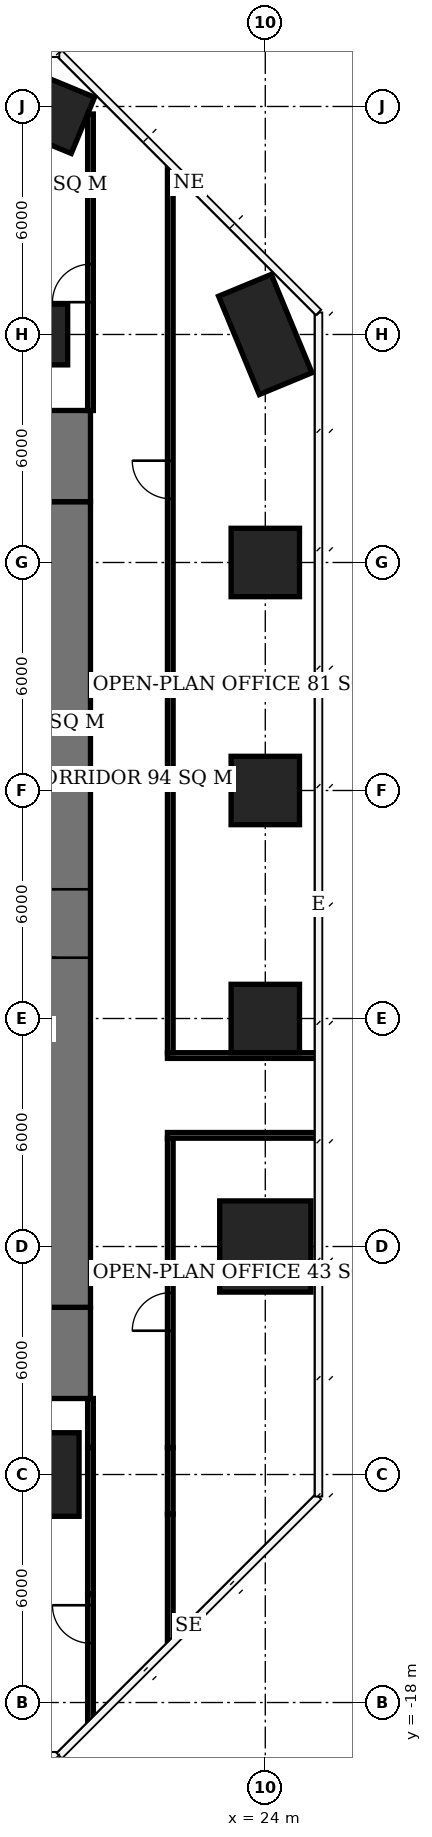
"""IFC4 building model, lengths in metres.
Left out: names, types, materials, properties, quantities, classifications, styles, units other than length and angle.
Written with IfcOpenShell. Run it as: python <this file> out.ifc"""

import sys

from ifc_helpers import new_model, si_unit, direction, frame, frame_2d, origin, origin_2d, place, context, subcontext, project, spatial, rectangle, extrude, element, fill, save


model = new_model("IFC4")
c1 = context("Model", 3, precision=1e-05, world=origin(), true_north=direction((0.0, 1.0)))
c2 = subcontext(c1, "Body", "Model", "MODEL_VIEW")
j1 = project(units=[si_unit("LENGTHUNIT", "METRE"), si_unit("PLANEANGLEUNIT", "RADIAN")], contexts=[c1])
p1 = place(None, origin())
s1 = spatial("IfcSite", under=j1, at=p1, CompositionType="ELEMENT")
p2 = place(p1, origin())
s2 = spatial("IfcBuilding", under=s1, at=p2, CompositionType="ELEMENT")
p3 = place(p2, frame((0.0, 0.0, 132.8)))
s3 = spatial("IfcBuildingStorey", under=s2, at=p3, CompositionType="ELEMENT", Elevation=132.8)
p4 = place(p3, frame((18.0, -12.0, 0.0), z_axis=(0.0, 0.0, 1.0), x_axis=(1.0, 0.0, 0.0)))
e1 = element("IfcColumn", 1, at=p4, inside=s3, PredefinedType="COLUMN", context=c2, shape_type="SweptSolid", body=[
    extrude(rectangle(XDim=2.2, YDim=2.2, at=origin_2d()), origin(), (0.0, 0.0, 1.0), 3.9),
])
p5 = place(p3, frame((18.0, 18.0, 0.0), z_axis=(0.0, 0.0, 1.0), x_axis=(1.0, 0.0, 0.0)))
e2 = element("IfcColumn", 2, at=p5, inside=s3, PredefinedType="COLUMN", context=c2, shape_type="SweptSolid", body=[
    extrude(rectangle(XDim=1.6, YDim=1.6, at=origin_2d()), origin(), (0.0, 0.0, 1.0), 3.9),
])
p6 = place(p3, frame((18.0, 24.0, 0.0), z_axis=(0.0, 0.0, 1.0), x_axis=(0.923879532511, -0.382683432365, 0.0)))
e3 = element("IfcColumn", 3, at=p6, inside=s3, PredefinedType="COLUMN", context=c2, shape_type="SweptSolid", body=[
    extrude(rectangle(XDim=2.6, YDim=1.6, at=origin_2d()), origin(), (0.0, 0.0, 1.0), 3.9),
])
p7 = place(p3, frame((24.0, -6.0, 0.0), z_axis=(0.0, 0.0, 1.0), x_axis=(1.0, 0.0, 0.0)))
e4 = element("IfcColumn", 4, at=p7, inside=s3, PredefinedType="COLUMN", context=c2, shape_type="SweptSolid", body=[
    extrude(rectangle(XDim=2.4, YDim=2.4, at=origin_2d()), origin(), (0.0, 0.0, 1.0), 3.9),
])
for number, where, z_axis, x_axis in (
    (5, (24.0, 0.0, 0.0), (0.0, 0.0, 1.0), (1.0, 0.0, 0.0)),
    (6, (24.0, 6.0, 0.0), (0.0, 0.0, 1.0), (1.0, 0.0, 0.0)),
    (7, (24.0, 12.0, 0.0), (0.0, 0.0, 1.0), (1.0, 0.0, 0.0)),
):
    element("IfcColumn", number, at=place(p3, frame(where, z_axis=z_axis, x_axis=x_axis)), inside=s3, PredefinedType="COLUMN", context=c2, shape_type="SweptSolid", body=[
        extrude(rectangle(XDim=1.8, YDim=1.8, at=origin_2d()), origin(), (0.0, 0.0, 1.0), 3.9),
    ])
p8 = place(p3, frame((24.0, 18.0, 0.0), z_axis=(0.0, 0.0, 1.0), x_axis=(0.382683432365, -0.923879532511, 0.0)))
e8 = element("IfcColumn", 8, at=p8, inside=s3, PredefinedType="COLUMN", context=c2, shape_type="SweptSolid", body=[
    extrude(rectangle(XDim=2.8, YDim=1.5, at=origin_2d()), origin(), (0.0, 0.0, 1.0), 3.9),
])
p9 = place(p3, frame((18.5, -7.6, 0.0), z_axis=(0.0, 0.0, 1.0), x_axis=(0.0, 1.0, 0.0)))
e9 = element("IfcWall", 9, at=p9, inside=s3, PredefinedType="SHEAR", context=c2, shape_type="SweptSolid", body=[
    extrude(rectangle(XDim=21.2, YDim=1.8, at=frame_2d((10.6, 0.0))), origin(), (0.0, 0.0, 1.0), 3.9),
])
p10 = place(p9, frame((9.2, 0.0, 0.0)))
e10 = element("IfcOpeningElement", 10, at=p10, cuts=e9, PredefinedType="OPENING", context=c2, shape_type="SweptSolid", body=[
    extrude(rectangle(XDim=1.8, YDim=2.4, at=frame_2d((0.9, 1.2))), frame((0.0, 0.91, 0.0), z_axis=(0.0, -1.0, 0.0), x_axis=(1.0, 0.0, 0.0)), (0.0, 0.0, 1.0), 1.82),
])
for number, where, z_axis, x_axis in (
    (11, (18.5, -10.0, 0.0), (0.0, 0.0, 1.0), (0.0, 1.0, 0.0)),
    (12, (18.5, 13.6, 0.0), (0.0, 0.0, 1.0), (0.0, 1.0, 0.0)),
):
    element("IfcWall", number, at=place(p3, frame(where, z_axis=z_axis, x_axis=x_axis)), inside=s3, PredefinedType="SHEAR", context=c2, shape_type="SweptSolid", body=[
        extrude(rectangle(XDim=2.4, YDim=1.8, at=frame_2d((1.2, 0.0))), origin(), (0.0, 0.0, 1.0), 3.9),
    ])
p11 = place(p3, frame((19.4, -18.489, 0.0), z_axis=(0.0, 0.0, 1.0), x_axis=(0.0, 1.0, 0.0)))
e13 = element("IfcWall", 13, at=p11, inside=s3, PredefinedType="PARTITIONING", context=c2, shape_type="SweptSolid", body=[
    extrude(rectangle(XDim=3.349, YDim=0.15, at=frame_2d((1.675, 0.0))), origin(), (0.0, 0.0, 1.0), 3.65),
])
p12 = place(p11, frame((2.049, 0.0, 0.0)))
e14 = element("IfcOpeningElement", 14, at=p12, cuts=e13, PredefinedType="OPENING", context=c2, shape_type="SweptSolid", body=[
    extrude(rectangle(XDim=1.0, YDim=2.1, at=frame_2d((0.5, 1.05))), frame((0.0, 0.085, 0.0), z_axis=(0.0, -1.0, 0.0), x_axis=(1.0, 0.0, 0.0)), (0.0, 0.0, 1.0), 0.17),
])
p13 = place(p3, frame((19.4, -15.14, 0.0), z_axis=(0.0, 0.0, 1.0), x_axis=(0.0, 1.0, 0.0)))
e15 = element("IfcWall", 15, at=p13, inside=s3, PredefinedType="PARTITIONING", context=c2, shape_type="SweptSolid", body=[
    extrude(rectangle(XDim=3.85, YDim=0.15, at=frame_2d((1.925, 0.0))), origin(), (0.0, 0.0, 1.0), 2.65),
])
p14 = place(p3, frame((19.4, -11.29, 0.0), z_axis=(0.0, 0.0, 1.0), x_axis=(0.0, 1.0, 0.0)))
e16 = element("IfcWall", 16, at=p14, inside=s3, PredefinedType="PARTITIONING", context=c2, shape_type="SweptSolid", body=[
    extrude(rectangle(XDim=1.29, YDim=0.15, at=frame_2d((0.645, 0.0))), origin(), (0.0, 0.0, 1.0), 3.65),
])
p15 = place(p3, frame((19.4, 16.0, 0.0), z_axis=(0.0, 0.0, 1.0), x_axis=(0.0, 1.0, 0.0)))
e17 = element("IfcWall", 17, at=p15, inside=s3, PredefinedType="PARTITIONING", context=c2, shape_type="SweptSolid", body=[
    extrude(rectangle(XDim=7.802, YDim=0.15, at=frame_2d((3.901, 0.0))), origin(), (0.0, 0.0, 1.0), 3.65),
])
p16 = place(p15, frame((2.85, 0.0, 0.0)))
e18 = element("IfcOpeningElement", 18, at=p16, cuts=e17, PredefinedType="OPENING", context=c2, shape_type="SweptSolid", body=[
    extrude(rectangle(XDim=1.0, YDim=2.1, at=frame_2d((0.5, 1.05))), frame((0.0, 0.085, 0.0), z_axis=(0.0, -1.0, 0.0), x_axis=(1.0, 0.0, 0.0)), (0.0, 0.0, 1.0), 0.17),
])
p17 = place(p3, frame((21.5, -16.388, 0.0), z_axis=(0.0, 0.0, 1.0), x_axis=(0.0, 1.0, 0.0)))
e19 = element("IfcWall", 19, at=p17, inside=s3, PredefinedType="PARTITIONING", context=c2, shape_type="SweptSolid", body=[
    extrude(rectangle(XDim=3.348, YDim=0.15, at=frame_2d((1.674, 0.0))), origin(), (0.0, 0.0, 1.0), 3.65),
])
p18 = place(p3, frame((21.5, -13.04, 0.0), z_axis=(0.0, 0.0, 1.0), x_axis=(0.0, 1.0, 0.0)))
e20 = element("IfcWall", 20, at=p18, inside=s3, PredefinedType="PARTITIONING", context=c2, shape_type="SweptSolid", body=[
    extrude(rectangle(XDim=1.75, YDim=0.15, at=frame_2d((0.875, 0.0))), origin(), (0.0, 0.0, 1.0), 2.65),
])
p19 = place(p3, frame((21.5, -11.29, 0.0), z_axis=(0.0, 0.0, 1.0), x_axis=(0.0, 1.0, 0.0)))
e21 = element("IfcWall", 21, at=p19, inside=s3, PredefinedType="PARTITIONING", context=c2, shape_type="SweptSolid", body=[
    extrude(rectangle(XDim=8.14, YDim=0.15, at=frame_2d((4.07, 0.0))), origin(), (0.0, 0.0, 1.0), 3.65),
])
p20 = place(p19, frame((3.074, 0.0, 0.0)))
e22 = element("IfcOpeningElement", 22, at=p20, cuts=e21, PredefinedType="OPENING", context=c2, shape_type="SweptSolid", body=[
    extrude(rectangle(XDim=1.0, YDim=2.1, at=frame_2d((0.5, 1.05))), frame((0.0, 0.085, 0.0), z_axis=(0.0, -1.0, 0.0), x_axis=(1.0, 0.0, 0.0)), (0.0, 0.0, 1.0), 0.17),
])
p21 = place(p3, frame((21.425, -3.075, 0.0), z_axis=(0.0, 0.0, 1.0), x_axis=(1.0, 0.0, 0.0)))
e23 = element("IfcWall", 23, at=p21, inside=s3, PredefinedType="PARTITIONING", context=c2, shape_type="SweptSolid", body=[
    extrude(rectangle(XDim=3.975, YDim=0.15, at=frame_2d((1.987, 0.0))), origin(), (0.0, 0.0, 1.0), 3.65),
])
p22 = place(p3, frame((21.5, -0.9, 0.0), z_axis=(0.0, 0.0, 1.0), x_axis=(0.0, 1.0, 0.0)))
e24 = element("IfcWall", 24, at=p22, inside=s3, PredefinedType="PARTITIONING", context=c2, shape_type="SweptSolid", body=[
    extrude(rectangle(XDim=23.288, YDim=0.15, at=frame_2d((11.644, 0.0))), origin(), (0.0, 0.0, 1.0), 3.65),
])
p23 = place(p22, frame((14.579, 0.0, 0.0)))
e25 = element("IfcOpeningElement", 25, at=p23, cuts=e24, PredefinedType="OPENING", context=c2, shape_type="SweptSolid", body=[
    extrude(rectangle(XDim=1.0, YDim=2.1, at=frame_2d((0.5, 1.05))), frame((0.0, 0.085, 0.0), z_axis=(0.0, -1.0, 0.0), x_axis=(1.0, 0.0, 0.0)), (0.0, 0.0, 1.0), 0.17),
])
p24 = place(p3, frame((21.425, -0.975, 0.0), z_axis=(0.0, 0.0, 1.0), x_axis=(1.0, 0.0, 0.0)))
e26 = element("IfcWall", 26, at=p24, inside=s3, PredefinedType="PARTITIONING", context=c2, shape_type="SweptSolid", body=[
    extrude(rectangle(XDim=3.975, YDim=0.15, at=frame_2d((1.987, 0.0))), origin(), (0.0, 0.0, 1.0), 3.65),
])
p25 = place(p10, origin())
e27 = element("IfcDoor", 27, at=p25, inside=s3, OperationType="DOUBLE_DOOR_SINGLE_SWING", PredefinedType="DOOR", context=c2, shape_type="SweptSolid", body=[
    extrude(rectangle(XDim=1.8, YDim=2.4, at=frame_2d((0.9, 1.2))), frame((0.0, 0.025, 0.0), z_axis=(0.0, -1.0, 0.0), x_axis=(1.0, 0.0, 0.0)), (0.0, 0.0, 1.0), 0.05),
])
fill(e10, e27)
p26 = place(p12, origin())
e28 = element("IfcDoor", 28, at=p26, inside=s3, OperationType="SINGLE_SWING_RIGHT", PredefinedType="DOOR", context=c2, shape_type="SweptSolid", body=[
    extrude(rectangle(XDim=1.0, YDim=2.1, at=frame_2d((0.5, 1.05))), frame((0.0, 0.025, 0.0), z_axis=(0.0, -1.0, 0.0), x_axis=(1.0, 0.0, 0.0)), (0.0, 0.0, 1.0), 0.05),
])
fill(e14, e28)
p27 = place(p20, origin())
e29 = element("IfcDoor", 29, at=p27, inside=s3, OperationType="SINGLE_SWING_LEFT", PredefinedType="DOOR", context=c2, shape_type="SweptSolid", body=[
    extrude(rectangle(XDim=1.0, YDim=2.1, at=frame_2d((0.5, 1.05))), frame((0.0, 0.025, 0.0), z_axis=(0.0, -1.0, 0.0), x_axis=(1.0, 0.0, 0.0)), (0.0, 0.0, 1.0), 0.05),
])
fill(e22, e29)
p28 = place(p23, origin())
e30 = element("IfcDoor", 30, at=p28, inside=s3, OperationType="SINGLE_SWING_RIGHT", PredefinedType="DOOR", context=c2, shape_type="SweptSolid", body=[
    extrude(rectangle(XDim=1.0, YDim=2.1, at=frame_2d((0.5, 1.05))), frame((0.0, 0.025, 0.0), z_axis=(0.0, -1.0, 0.0), x_axis=(1.0, 0.0, 0.0)), (0.0, 0.0, 1.0), 0.05),
])
fill(e25, e30)
p29 = place(p16, origin())
e31 = element("IfcDoor", 31, at=p29, inside=s3, OperationType="SINGLE_SWING_LEFT", PredefinedType="DOOR", context=c2, shape_type="SweptSolid", body=[
    extrude(rectangle(XDim=1.0, YDim=2.1, at=frame_2d((0.5, 1.05))), frame((0.0, 0.025, 0.0), z_axis=(0.0, -1.0, 0.0), x_axis=(1.0, 0.0, 0.0)), (0.0, 0.0, 1.0), 0.05),
])
fill(e18, e31)
save(model, sys.argv[1])
